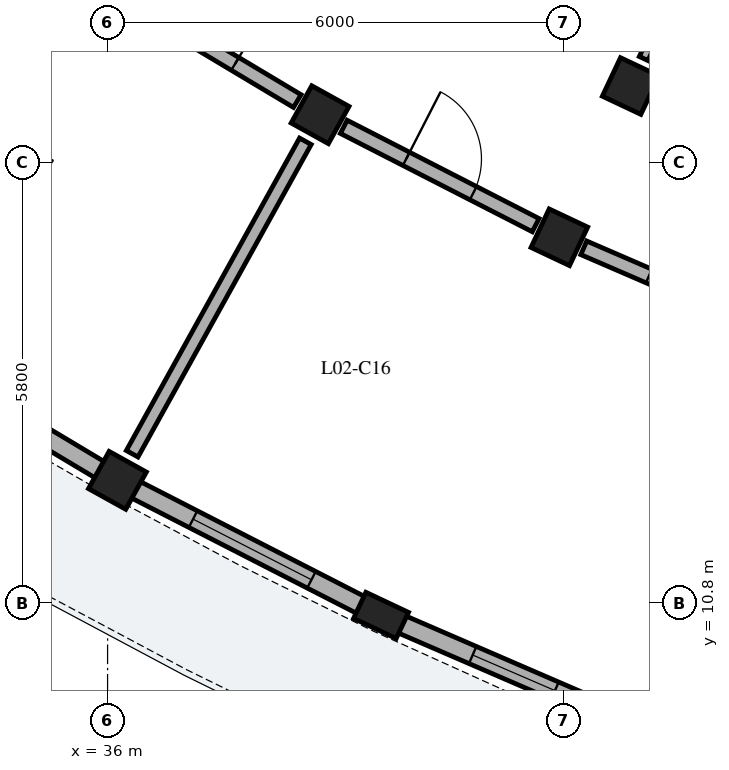
"""IFC4 building model, lengths in metres.
Left out: names, types, materials, properties, quantities, classifications, styles, units other than length and angle.
Written with IfcOpenShell. Run it as: python <this file> out.ifc"""

import sys

from ifc_helpers import new_model, si_unit, direction, frame, frame_2d, origin, origin_2d, place, context, subcontext, project, spatial, rectangle, extrude, element, fill, save


model = new_model("IFC4")
c1 = context("Model", 3, precision=1e-05, world=origin(), true_north=direction((0.0, 1.0)))
c2 = subcontext(c1, "Body", "Model", "MODEL_VIEW")
j1 = project(units=[si_unit("LENGTHUNIT", "METRE"), si_unit("PLANEANGLEUNIT", "RADIAN")], contexts=[c1])
p1 = place(None, origin())
s1 = spatial("IfcSite", under=j1, at=p1, CompositionType="ELEMENT")
p2 = place(p1, origin())
s2 = spatial("IfcBuilding", under=s1, at=p2, CompositionType="ELEMENT")
p3 = place(p2, frame((0.0, 0.0, 8.84)))
s3 = spatial("IfcBuildingStorey", under=s2, at=p3, CompositionType="ELEMENT", Elevation=8.84)
for number, where, z_axis, x_axis in (
    (1, (38.796, 17.227, 0.0), (0.0, 0.0, 1.0), (-0.485, -0.875, 0.0)),
    (2, (36.13, 12.417, 0.0), (0.0, 0.0, 1.0), (-0.485, -0.875, 0.0)),
    (3, (42.882, 17.604, 0.0), (0.0, 0.0, 1.0), (-0.427, -0.904, 0.0)),
    (4, (41.944, 15.614, 0.0), (0.0, 0.0, 1.0), (-0.427, -0.904, 0.0)),
):
    element("IfcColumn", number, at=place(p3, frame(where, z_axis=z_axis, x_axis=x_axis)), inside=s3, PredefinedType="COLUMN", context=c2, shape_type="SweptSolid", body=[
        extrude(rectangle(XDim=0.56, YDim=0.56, at=origin_2d()), origin(), (0.0, 0.0, 1.0), 3.105),
    ])
p4 = place(p3, frame((39.598, 10.64, 0.0), z_axis=(0.0, 0.0, 1.0), x_axis=(-0.426568739901, -0.904455145454, 0.0)))
e5 = element("IfcColumn", 5, at=p4, inside=s3, PredefinedType="PILASTER", context=c2, shape_type="SweptSolid", body=[
    extrude(rectangle(XDim=0.38, YDim=0.62, at=origin_2d()), origin(), (0.0, 0.0, 1.0), 3.105),
])
p5 = place(p3, frame((32.922, 14.334, 0.0), z_axis=(0.0, 0.0, 1.0), x_axis=(0.858288874148, -0.513166842766, 0.0)))
e6 = element("IfcWall", 6, at=p5, inside=s3, PredefinedType="SOLIDWALL", context=c2, shape_type="SweptSolid", body=[
    extrude(rectangle(XDim=3.487, YDim=0.245, at=frame_2d((1.743, 0.0))), origin(), (0.0, 0.0, 1.0), 2.355),
])
p6 = place(p5, frame((0.943, 0.0, 0.35)))
e7 = element("IfcOpeningElement", 7, at=p6, cuts=e6, PredefinedType="OPENING", context=c2, shape_type="SweptSolid", body=[
    extrude(rectangle(XDim=1.6, YDim=1.75, at=frame_2d((0.8, 0.875))), frame((0.0, 0.133, 0.0), z_axis=(0.0, -1.0, 0.0), x_axis=(1.0, 0.0, 0.0)), (0.0, 0.0, 1.0), 0.265),
])
p7 = place(p3, frame((36.352, 12.302, 0.0), z_axis=(0.0, 0.0, 1.0), x_axis=(0.890001092753, -0.45595839163, 0.0)))
e8 = element("IfcWall", 8, at=p7, inside=s3, PredefinedType="SOLIDWALL", context=c2, shape_type="SweptSolid", body=[
    extrude(rectangle(XDim=3.487, YDim=0.245, at=frame_2d((1.743, 0.0))), origin(), (0.0, 0.0, 1.0), 2.355),
])
p8 = place(p7, frame((0.868, 0.0, 0.35)))
e9 = element("IfcOpeningElement", 9, at=p8, cuts=e8, PredefinedType="OPENING", context=c2, shape_type="SweptSolid", body=[
    extrude(rectangle(XDim=1.75, YDim=1.85, at=frame_2d((0.875, 0.925))), frame((0.0, 0.133, 0.0), z_axis=(0.0, -1.0, 0.0), x_axis=(1.0, 0.0, 0.0)), (0.0, 0.0, 1.0), 0.265),
])
p9 = place(p3, frame((39.745, 10.576, 0.0), z_axis=(0.0, 0.0, 1.0), x_axis=(0.917938367037, -0.396723019652, 0.0)))
e10 = element("IfcWall", 10, at=p9, inside=s3, PredefinedType="SOLIDWALL", context=c2, shape_type="SweptSolid", body=[
    extrude(rectangle(XDim=3.487, YDim=0.245, at=frame_2d((1.743, 0.0))), origin(), (0.0, 0.0, 1.0), 2.355),
])
p10 = place(p9, frame((1.153, 0.0, 0.55)))
e11 = element("IfcOpeningElement", 11, at=p10, cuts=e10, PredefinedType="OPENING", context=c2, shape_type="SweptSolid", body=[
    extrude(rectangle(XDim=1.18, YDim=1.48, at=frame_2d((0.59, 0.74))), frame((0.0, 0.133, 0.0), z_axis=(0.0, -1.0, 0.0), x_axis=(1.0, 0.0, 0.0)), (0.0, 0.0, 1.0), 0.265),
])
p11 = place(p3, frame((35.544, 18.705, 0.0), z_axis=(0.0, 0.0, 1.0), x_axis=(-0.540959731567, -0.84104849374, 0.0)))
e12 = element("IfcWall", 12, at=p11, inside=s3, PredefinedType="PARTITIONING", context=c2, shape_type="SweptSolid", body=[
    extrude(rectangle(XDim=4.7, YDim=0.125, at=frame_2d((2.35, 0.0))), origin(), (0.0, 0.0, 1.0), 2.37),
])
p12 = place(p11, frame((1.895, 0.0, 0.0)))
e13 = element("IfcOpeningElement", 13, at=p12, cuts=e12, PredefinedType="OPENING", context=c2, shape_type="SweptSolid", body=[
    extrude(rectangle(XDim=0.91, YDim=2.1, at=frame_2d((0.455, 1.05))), frame((0.0, 0.073, 0.0), z_axis=(0.0, -1.0, 0.0), x_axis=(1.0, 0.0, 0.0)), (0.0, 0.0, 1.0), 0.145),
])
p13 = place(p3, frame((36.061, 18.862, 0.0), z_axis=(0.0, 0.0, 1.0), x_axis=(0.858281647443, -0.51317892948, 0.0)))
e14 = element("IfcWall", 14, at=p13, inside=s3, PredefinedType="PARTITIONING", context=c2, shape_type="SweptSolid", body=[
    extrude(rectangle(XDim=2.837, YDim=0.195, at=frame_2d((1.418, 0.0))), origin(), (0.0, 0.0, 1.0), 2.37),
])
p14 = place(p13, frame((0.954, 0.0, 0.0)))
e15 = element("IfcOpeningElement", 15, at=p14, cuts=e14, PredefinedType="OPENING", context=c2, shape_type="SweptSolid", body=[
    extrude(rectangle(XDim=0.93, YDim=2.12, at=frame_2d((0.465, 1.06))), frame((0.0, 0.107, 0.0), z_axis=(0.0, -1.0, 0.0), x_axis=(1.0, 0.0, 0.0)), (0.0, 0.0, 1.0), 0.215),
])
p15 = place(p3, frame((38.602, 16.877, 0.0), z_axis=(0.0, 0.0, 1.0), x_axis=(-0.484813534336, -0.874617537513, 0.0)))
e16 = element("IfcWall", 16, at=p15, inside=s3, PredefinedType="PARTITIONING", context=c2, shape_type="SweptSolid", body=[
    extrude(rectangle(XDim=4.7, YDim=0.175, at=frame_2d((2.35, 0.0))), origin(), (0.0, 0.0, 1.0), 2.37),
])
p16 = place(p3, frame((39.107, 17.067, 0.0), z_axis=(0.0, 0.0, 1.0), x_axis=(0.890030590607, -0.45590080915, 0.0)))
e17 = element("IfcWall", 17, at=p16, inside=s3, PredefinedType="PARTITIONING", context=c2, shape_type="SweptSolid", body=[
    extrude(rectangle(XDim=2.837, YDim=0.195, at=frame_2d((1.418, 0.0))), origin(), (0.0, 0.0, 1.0), 2.37),
])
p17 = place(p16, frame((0.924, 0.0, 0.0)))
e18 = element("IfcOpeningElement", 18, at=p17, cuts=e17, PredefinedType="OPENING", context=c2, shape_type="SweptSolid", body=[
    extrude(rectangle(XDim=0.99, YDim=2.16, at=frame_2d((0.495, 1.08))), frame((0.0, 0.107, 0.0), z_axis=(0.0, -1.0, 0.0), x_axis=(1.0, 0.0, 0.0)), (0.0, 0.0, 1.0), 0.215),
])
p18 = place(p3, frame((45.868, 23.935, 0.0), z_axis=(0.0, 0.0, 1.0), x_axis=(-0.426573573579, -0.904452865728, 0.0)))
e19 = element("IfcWall", 19, at=p18, inside=s3, PredefinedType="PARTITIONING", context=c2, shape_type="SweptSolid", body=[
    extrude(rectangle(XDim=6.6, YDim=0.125, at=frame_2d((3.3, 0.0))), origin(), (0.0, 0.0, 1.0), 2.37),
])
p19 = place(p18, frame((2.845, 0.0, 0.0)))
e20 = element("IfcOpeningElement", 20, at=p19, cuts=e19, PredefinedType="OPENING", context=c2, shape_type="SweptSolid", body=[
    extrude(rectangle(XDim=0.91, YDim=2.1, at=frame_2d((0.455, 1.05))), frame((0.0, 0.073, 0.0), z_axis=(0.0, -1.0, 0.0), x_axis=(1.0, 0.0, 0.0)), (0.0, 0.0, 1.0), 0.145),
])
p20 = place(p3, frame((42.265, 15.475, 0.0), z_axis=(0.0, 0.0, 1.0), x_axis=(0.917943439406, -0.396711282991, 0.0)))
e21 = element("IfcWall", 21, at=p20, inside=s3, PredefinedType="PARTITIONING", context=c2, shape_type="SweptSolid", body=[
    extrude(rectangle(XDim=2.837, YDim=0.195, at=frame_2d((1.418, 0.0))), origin(), (0.0, 0.0, 1.0), 2.37),
])
p21 = place(p20, frame((0.934, 0.0, 0.0)))
e22 = element("IfcOpeningElement", 22, at=p21, cuts=e21, PredefinedType="OPENING", context=c2, shape_type="SweptSolid", body=[
    extrude(rectangle(XDim=0.97, YDim=2.15, at=frame_2d((0.485, 1.075))), frame((0.0, 0.107, 0.0), z_axis=(0.0, -1.0, 0.0), x_axis=(1.0, 0.0, 0.0)), (0.0, 0.0, 1.0), 0.215),
])
p22 = place(p8, origin())
e23 = element("IfcWindow", 23, at=p22, inside=s3, PartitioningType="SINGLE_PANEL", PredefinedType="WINDOW", context=c2, shape_type="SweptSolid", body=[
    extrude(rectangle(XDim=1.75, YDim=1.85, at=frame_2d((0.875, 0.925))), frame((0.0, 0.03, 0.0), z_axis=(0.0, -1.0, 0.0), x_axis=(1.0, 0.0, 0.0)), (0.0, 0.0, 1.0), 0.06),
])
fill(e9, e23)
p23 = place(p10, origin())
e24 = element("IfcWindow", 24, at=p23, inside=s3, PartitioningType="SINGLE_PANEL", PredefinedType="WINDOW", context=c2, shape_type="SweptSolid", body=[
    extrude(rectangle(XDim=1.18, YDim=1.48, at=frame_2d((0.59, 0.74))), frame((0.0, 0.03, 0.0), z_axis=(0.0, -1.0, 0.0), x_axis=(1.0, 0.0, 0.0)), (0.0, 0.0, 1.0), 0.06),
])
fill(e11, e24)
p24 = place(p14, origin())
e25 = element("IfcDoor", 25, at=p24, inside=s3, OperationType="SINGLE_SWING_RIGHT", PredefinedType="DOOR", context=c2, shape_type="SweptSolid", body=[
    extrude(rectangle(XDim=0.93, YDim=2.12, at=frame_2d((0.465, 1.06))), frame((0.0, 0.025, 0.0), z_axis=(0.0, -1.0, 0.0), x_axis=(1.0, 0.0, 0.0)), (0.0, 0.0, 1.0), 0.05),
])
fill(e15, e25)
p25 = place(p17, origin())
e26 = element("IfcDoor", 26, at=p25, inside=s3, OperationType="SINGLE_SWING_LEFT", PredefinedType="DOOR", context=c2, shape_type="SweptSolid", body=[
    extrude(rectangle(XDim=0.99, YDim=2.16, at=frame_2d((0.495, 1.08))), frame((0.0, 0.025, 0.0), z_axis=(0.0, -1.0, 0.0), x_axis=(1.0, 0.0, 0.0)), (0.0, 0.0, 1.0), 0.05),
])
fill(e18, e26)
p26 = place(p21, origin())
e27 = element("IfcDoor", 27, at=p26, inside=s3, OperationType="SINGLE_SWING_RIGHT", PredefinedType="DOOR", context=c2, shape_type="SweptSolid", body=[
    extrude(rectangle(XDim=0.97, YDim=2.15, at=frame_2d((0.485, 1.075))), frame((0.0, 0.025, 0.0), z_axis=(0.0, -1.0, 0.0), x_axis=(1.0, 0.0, 0.0)), (0.0, 0.0, 1.0), 0.05),
])
fill(e22, e27)
save(model, sys.argv[1])
